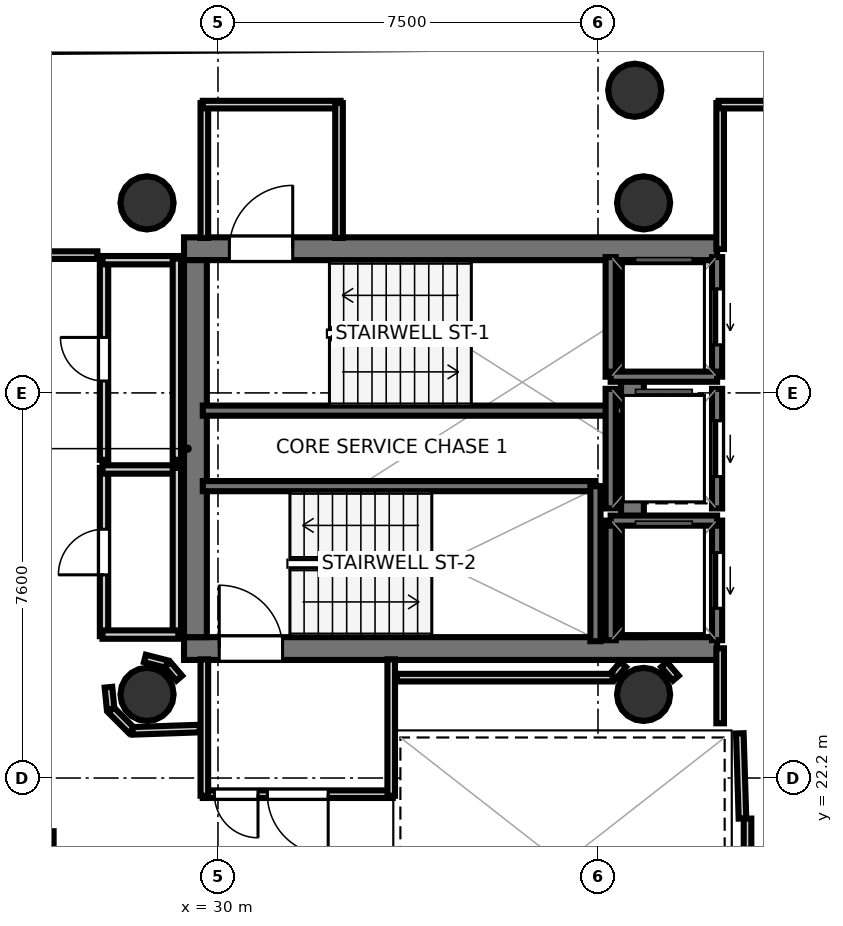
"""IFC4 building model, lengths in metres.
Left out: names, types, materials, properties, quantities, classifications, styles, units other than length and angle.
Written with IfcOpenShell. Run it as: python <this file> out.ifc"""

import sys

from ifc_helpers import new_model, si_unit, direction, frame, frame_2d, origin, origin_2d, place, context, subcontext, project, spatial, rectangle, hollow_circle, extrude, element, fill, save


model = new_model("IFC4")
c1 = context("Model", 3, precision=1e-05, world=origin(), true_north=direction((0.0, 1.0)))
c2 = subcontext(c1, "Body", "Model", "MODEL_VIEW")
j1 = project(units=[si_unit("LENGTHUNIT", "METRE"), si_unit("PLANEANGLEUNIT", "RADIAN")], contexts=[c1])
p1 = place(None, origin())
s1 = spatial("IfcSite", under=j1, at=p1, CompositionType="ELEMENT")
p2 = place(p1, origin())
s2 = spatial("IfcBuilding", under=s1, at=p2, CompositionType="ELEMENT")
p3 = place(p2, frame((0.0, 0.0, 253.8)))
s3 = spatial("IfcBuildingStorey", under=s2, at=p3, CompositionType="ELEMENT", Elevation=253.8)
p4 = place(p3, frame((29.33, 32.645, 0.0), z_axis=(0.0, 0.0, 1.0), x_axis=(1.0, 0.0, 0.0)))
e1 = element("IfcWall", 1, at=p4, inside=s3, PredefinedType="SHEAR", context=c2, shape_type="SweptSolid", body=[
    extrude(rectangle(XDim=10.52, YDim=0.45, at=frame_2d((5.26, 0.0))), origin(), (0.0, 0.0, 1.0), 3.52),
])
p5 = place(p4, frame((0.895, 0.0, 0.0)))
e2 = element("IfcOpeningElement", 2, at=p5, cuts=e1, PredefinedType="OPENING", context=c2, shape_type="SweptSolid", body=[
    extrude(rectangle(XDim=1.25, YDim=2.15, at=frame_2d((0.625, 1.075))), frame((0.0, 0.235, 0.0), z_axis=(0.0, -1.0, 0.0), x_axis=(1.0, 0.0, 0.0)), (0.0, 0.0, 1.0), 0.47),
])
p6 = place(p3, frame((29.33, 24.755, 0.0), z_axis=(0.0, 0.0, 1.0), x_axis=(1.0, 0.0, 0.0)))
e3 = element("IfcWall", 3, at=p6, inside=s3, PredefinedType="SHEAR", context=c2, shape_type="SweptSolid", body=[
    extrude(rectangle(XDim=10.52, YDim=0.45, at=frame_2d((5.26, 0.0))), origin(), (0.0, 0.0, 1.0), 3.52),
])
p7 = place(p6, frame((0.695, 0.0, 0.0)))
e4 = element("IfcOpeningElement", 4, at=p7, cuts=e3, PredefinedType="OPENING", context=c2, shape_type="SweptSolid", body=[
    extrude(rectangle(XDim=1.25, YDim=2.15, at=frame_2d((0.625, 1.075))), frame((0.0, 0.235, 0.0), z_axis=(0.0, -1.0, 0.0), x_axis=(1.0, 0.0, 0.0)), (0.0, 0.0, 1.0), 0.47),
])
for number, where, z_axis, x_axis in (
    (5, (29.555, 24.98, 0.0), (0.0, 0.0, 1.0), (0.0, 1.0, 0.0)),
    (6, (38.18, 24.98, 0.0), (0.0, 0.0, 1.0), (0.0, 1.0, 0.0)),
):
    element("IfcWall", number, at=place(p3, frame(where, z_axis=z_axis, x_axis=x_axis)), inside=s3, PredefinedType="SHEAR", context=c2, shape_type="SweptSolid", body=[
        extrude(rectangle(XDim=7.44, YDim=0.45, at=frame_2d((3.72, 0.0))), origin(), (0.0, 0.0, 1.0), 3.52),
    ])
for number, where, z_axis, x_axis in (
    (7, (28.6, 33.55, 0.0), (0.0, 0.0, 1.0), (1.0, 0.0, 0.0)),
    (8, (28.6, 23.85, 0.0), (0.0, 0.0, 1.0), (1.0, 0.0, 0.0)),
    (9, (38.4, 33.55, 0.0), (0.0, 0.0, 1.0), (1.0, 0.0, 0.0)),
    (10, (38.4, 23.85, 0.0), (0.0, 0.0, 1.0), (1.0, 0.0, 0.0)),
    (11, (38.225, 35.773, 0.0), (0.0, 0.0, 1.0), (1.0, 0.0, 0.0)),
):
    element("IfcColumn", number, at=place(p3, frame(where, z_axis=z_axis, x_axis=x_axis)), inside=s3, PredefinedType="COLUMN", context=c2, shape_type="SweptSolid", body=[
        extrude(hollow_circle(Radius=0.525, WallThickness=0.028, at=origin_2d()), origin(), (0.0, 0.0, 1.0), 3.7),
    ])
p8 = place(p3, frame((29.7, 29.45, 0.0), z_axis=(0.0, 0.0, 1.0), x_axis=(1.0, 0.0, 0.0)))
e12 = element("IfcWall", 12, at=p8, inside=s3, PredefinedType="SOLIDWALL", context=c2, shape_type="SweptSolid", body=[
    extrude(rectangle(XDim=8.3, YDim=0.2, at=frame_2d((4.15, 0.0))), origin(), (0.0, 0.0, 1.0), 3.52),
])
p9 = place(p3, frame((29.7, 27.96, 0.0), z_axis=(0.0, 0.0, 1.0), x_axis=(1.0, 0.0, 0.0)))
e13 = element("IfcWall", 13, at=p9, inside=s3, PredefinedType="SOLIDWALL", context=c2, shape_type="SweptSolid", body=[
    extrude(rectangle(XDim=7.75, YDim=0.2, at=frame_2d((3.875, 0.0))), origin(), (0.0, 0.0, 1.0), 3.52),
])
p10 = place(p3, frame((37.45, 24.9, 0.0), z_axis=(0.0, 0.0, 1.0), x_axis=(0.0, 1.0, 0.0)))
e14 = element("IfcWall", 14, at=p10, inside=s3, PredefinedType="SOLIDWALL", context=c2, shape_type="SweptSolid", body=[
    extrude(rectangle(XDim=3.06, YDim=0.2, at=frame_2d((1.53, 0.0))), origin(), (0.0, 0.0, 1.0), 3.52),
])
p11 = place(p3, frame((39.85, 30.12, 0.0), z_axis=(0.0, 0.0, 1.0), x_axis=(0.0, 1.0, 0.0)))
e15 = element("IfcWall", 15, at=p11, inside=s3, PredefinedType="SOLIDWALL", context=c2, shape_type="SweptSolid", body=[
    extrude(rectangle(XDim=2.36, YDim=0.2, at=frame_2d((1.18, 0.0))), origin(), (0.0, 0.0, 1.0), 3.52),
])
p12 = place(p11, frame((0.63, 0.0, 0.0)))
e16 = element("IfcOpeningElement", 16, at=p12, cuts=e15, PredefinedType="OPENING", context=c2, shape_type="SweptSolid", body=[
    extrude(rectangle(XDim=1.1, YDim=2.15, at=frame_2d((0.55, 1.075))), frame((0.0, 0.11, 0.0), z_axis=(0.0, -1.0, 0.0), x_axis=(1.0, 0.0, 0.0)), (0.0, 0.0, 1.0), 0.22),
])
p13 = place(p3, frame((37.75, 30.12, 0.0), z_axis=(0.0, 0.0, 1.0), x_axis=(0.0, 1.0, 0.0)))
e17 = element("IfcWall", 17, at=p13, inside=s3, PredefinedType="SOLIDWALL", context=c2, shape_type="SweptSolid", body=[
    extrude(rectangle(XDim=2.36, YDim=0.2, at=frame_2d((1.18, 0.0))), origin(), (0.0, 0.0, 1.0), 3.52),
])
p14 = place(p3, frame((37.75, 30.12, 0.0), z_axis=(0.0, 0.0, 1.0), x_axis=(1.0, 0.0, 0.0)))
e18 = element("IfcWall", 18, at=p14, inside=s3, PredefinedType="SOLIDWALL", context=c2, shape_type="SweptSolid", body=[
    extrude(rectangle(XDim=2.1, YDim=0.2, at=frame_2d((1.05, 0.0))), origin(), (0.0, 0.0, 1.0), 3.52),
])
p15 = place(p3, frame((39.85, 24.92, 0.0), z_axis=(0.0, 0.0, 1.0), x_axis=(0.0, 1.0, 0.0)))
e19 = element("IfcWall", 19, at=p15, inside=s3, PredefinedType="SOLIDWALL", context=c2, shape_type="SweptSolid", body=[
    extrude(rectangle(XDim=2.36, YDim=0.2, at=frame_2d((1.18, 0.0))), origin(), (0.0, 0.0, 1.0), 3.52),
])
p16 = place(p15, frame((0.63, 0.0, 0.0)))
e20 = element("IfcOpeningElement", 20, at=p16, cuts=e19, PredefinedType="OPENING", context=c2, shape_type="SweptSolid", body=[
    extrude(rectangle(XDim=1.1, YDim=2.15, at=frame_2d((0.55, 1.075))), frame((0.0, 0.11, 0.0), z_axis=(0.0, -1.0, 0.0), x_axis=(1.0, 0.0, 0.0)), (0.0, 0.0, 1.0), 0.22),
])
p17 = place(p3, frame((37.75, 24.92, 0.0), z_axis=(0.0, 0.0, 1.0), x_axis=(0.0, 1.0, 0.0)))
e21 = element("IfcWall", 21, at=p17, inside=s3, PredefinedType="SOLIDWALL", context=c2, shape_type="SweptSolid", body=[
    extrude(rectangle(XDim=2.36, YDim=0.2, at=frame_2d((1.18, 0.0))), origin(), (0.0, 0.0, 1.0), 3.52),
])
p18 = place(p3, frame((37.75, 27.28, 0.0), z_axis=(0.0, 0.0, 1.0), x_axis=(1.0, 0.0, 0.0)))
e22 = element("IfcWall", 22, at=p18, inside=s3, PredefinedType="SOLIDWALL", context=c2, shape_type="SweptSolid", body=[
    extrude(rectangle(XDim=2.1, YDim=0.2, at=frame_2d((1.05, 0.0))), origin(), (0.0, 0.0, 1.0), 3.52),
])
p19 = place(p3, frame((39.85, 27.52, 0.0), z_axis=(0.0, 0.0, 1.0), x_axis=(0.0, 1.0, 0.0)))
e23 = element("IfcWall", 23, at=p19, inside=s3, PredefinedType="SOLIDWALL", context=c2, shape_type="SweptSolid", body=[
    extrude(rectangle(XDim=2.36, YDim=0.2, at=frame_2d((1.18, 0.0))), origin(), (0.0, 0.0, 1.0), 3.52),
])
p20 = place(p19, frame((0.63, 0.0, 0.0)))
e24 = element("IfcOpeningElement", 24, at=p20, cuts=e23, PredefinedType="OPENING", context=c2, shape_type="SweptSolid", body=[
    extrude(rectangle(XDim=1.1, YDim=2.15, at=frame_2d((0.55, 1.075))), frame((0.0, 0.11, 0.0), z_axis=(0.0, -1.0, 0.0), x_axis=(1.0, 0.0, 0.0)), (0.0, 0.0, 1.0), 0.22),
])
p21 = place(p3, frame((37.75, 27.52, 0.0), z_axis=(0.0, 0.0, 1.0), x_axis=(0.0, 1.0, 0.0)))
e25 = element("IfcWall", 25, at=p21, inside=s3, PredefinedType="SOLIDWALL", context=c2, shape_type="SweptSolid", body=[
    extrude(rectangle(XDim=2.36, YDim=0.2, at=frame_2d((1.18, 0.0))), origin(), (0.0, 0.0, 1.0), 3.52),
])
p22 = place(p3, frame((29.731, 32.858, 0.0), z_axis=(0.0, 0.0, 1.0), x_axis=(0.0, 1.0, 0.0)))
e26 = element("IfcWall", 26, at=p22, inside=s3, PredefinedType="PARTITIONING", context=c2, shape_type="SweptSolid", body=[
    extrude(rectangle(XDim=2.662, YDim=0.15, at=frame_2d((1.331, 0.0))), origin(), (0.0, 0.0, 1.0), 2.84),
])
p23 = place(p3, frame((29.7, 35.489, 0.0), z_axis=(0.0, 0.0, 1.0), x_axis=(1.0, 0.0, 0.0)))
e27 = element("IfcWall", 27, at=p23, inside=s3, PredefinedType="PARTITIONING", context=c2, shape_type="SweptSolid", body=[
    extrude(rectangle(XDim=2.72, YDim=0.15, at=frame_2d((1.36, 0.0))), origin(), (0.0, 0.0, 1.0), 2.84),
])
p24 = place(p3, frame((32.389, 35.52, 0.0), z_axis=(0.0, 0.0, 1.0), x_axis=(0.0, -1.0, 0.0)))
e28 = element("IfcWall", 28, at=p24, inside=s3, PredefinedType="PARTITIONING", context=c2, shape_type="SweptSolid", body=[
    extrude(rectangle(XDim=2.662, YDim=0.15, at=frame_2d((1.331, 0.0))), origin(), (0.0, 0.0, 1.0), 2.84),
])
p25 = place(p3, frame((33.45, 21.881, 0.0), z_axis=(0.0, 0.0, 1.0), x_axis=(-1.0, 0.0, 0.0)))
e29 = element("IfcWall", 29, at=p25, inside=s3, PredefinedType="PARTITIONING", context=c2, shape_type="SweptSolid", body=[
    extrude(rectangle(XDim=3.75, YDim=0.15, at=frame_2d((1.875, 0.0))), origin(), (0.0, 0.0, 1.0), 2.84),
])
p26 = place(p25, frame((1.275, 0.0, 0.0)))
e30 = element("IfcOpeningElement", 30, at=p26, cuts=e29, PredefinedType="OPENING", context=c2, shape_type="SweptSolid", body=[
    extrude(rectangle(XDim=1.2, YDim=2.15, at=frame_2d((0.6, 1.075))), frame((0.0, 0.085, 0.0), z_axis=(0.0, -1.0, 0.0), x_axis=(1.0, 0.0, 0.0)), (0.0, 0.0, 1.0), 0.17),
])
p27 = place(p25, frame((2.66, 0.0, 0.0)))
e31 = element("IfcOpeningElement", 31, at=p27, cuts=e29, PredefinedType="OPENING", context=c2, shape_type="SweptSolid", body=[
    extrude(rectangle(XDim=0.86, YDim=2.05, at=frame_2d((0.43, 1.025))), frame((0.0, 0.085, 0.0), z_axis=(0.0, -1.0, 0.0), x_axis=(1.0, 0.0, 0.0)), (0.0, 0.0, 1.0), 0.17),
])
for number, where, z_axis, x_axis in (
    (32, (29.731, 21.85, 0.0), (0.0, 0.0, 1.0), (0.0, 1.0, 0.0)),
    (33, (33.419, 24.542, 0.0), (0.0, 0.0, 1.0), (0.0, -1.0, 0.0)),
):
    element("IfcWall", number, at=place(p3, frame(where, z_axis=z_axis, x_axis=x_axis)), inside=s3, PredefinedType="PARTITIONING", context=c2, shape_type="SweptSolid", body=[
        extrude(rectangle(XDim=2.692, YDim=0.15, at=frame_2d((1.346, 0.0))), origin(), (0.0, 0.0, 1.0), 2.84),
    ])
p28 = place(p3, frame((40.351, 21.401, 0.0), z_axis=(0.0, 0.0, 1.0), x_axis=(-0.031058045979, 0.999517582527, 0.0)))
e34 = element("IfcWall", 34, at=p28, inside=s3, PredefinedType="PARTITIONING", context=c2, shape_type="SweptSolid", body=[
    extrude(rectangle(XDim=1.682, YDim=0.15, at=frame_2d((0.841, 0.0))), origin(), (0.0, 0.0, 1.0), 2.84),
])
p29 = place(p3, frame((39.911, 23.28, 0.0), z_axis=(0.0, 0.0, 1.0), x_axis=(0.0, 1.0, 0.0)))
e35 = element("IfcWall", 35, at=p29, inside=s3, PredefinedType="PARTITIONING", context=c2, shape_type="SweptSolid", body=[
    extrude(rectangle(XDim=1.48, YDim=0.15, at=frame_2d((0.74, 0.0))), origin(), (0.0, 0.0, 1.0), 2.84),
])
p30 = place(p3, frame((39.911, 32.64, 0.0), z_axis=(0.0, 0.0, 1.0), x_axis=(0.0, 1.0, 0.0)))
e36 = element("IfcWall", 36, at=p30, inside=s3, PredefinedType="PARTITIONING", context=c2, shape_type="SweptSolid", body=[
    extrude(rectangle(XDim=2.88, YDim=0.15, at=frame_2d((1.44, 0.0))), origin(), (0.0, 0.0, 1.0), 2.84),
])
p31 = place(p3, frame((39.88, 35.489, 0.0), z_axis=(0.0, 0.0, 1.0), x_axis=(1.0, 0.0, 0.0)))
e37 = element("IfcWall", 37, at=p31, inside=s3, PredefinedType="PARTITIONING", context=c2, shape_type="SweptSolid", body=[
    extrude(rectangle(XDim=1.48, YDim=0.15, at=frame_2d((0.74, 0.0))), origin(), (0.0, 0.0, 1.0), 2.84),
])
p32 = place(p3, frame((40.451, 18.08, 0.0), z_axis=(0.0, 0.0, 1.0), x_axis=(0.0, 1.0, 0.0)))
e38 = element("IfcWall", 38, at=p32, inside=s3, PredefinedType="PARTITIONING", context=c2, shape_type="SweptSolid", body=[
    extrude(rectangle(XDim=3.32, YDim=0.15, at=frame_2d((1.66, 0.0))), origin(), (0.0, 0.0, 1.0), 2.84),
])
p33 = place(p3, frame((27.751, 25.0, 0.0), z_axis=(0.0, 0.0, 1.0), x_axis=(0.0, 1.0, 0.0)))
e39 = element("IfcWall", 39, at=p33, inside=s3, PredefinedType="PLUMBINGWALL", context=c2, shape_type="SweptSolid", body=[
    extrude(rectangle(XDim=3.32, YDim=0.165, at=frame_2d((1.66, 0.0))), origin(), (0.0, 0.0, 1.0), 2.84),
])
p34 = place(p33, frame((1.21, 0.0, 0.0)))
e40 = element("IfcOpeningElement", 40, at=p34, cuts=e39, PredefinedType="OPENING", context=c2, shape_type="SweptSolid", body=[
    extrude(rectangle(XDim=0.9, YDim=2.1, at=frame_2d((0.45, 1.05))), frame((0.0, 0.093, 0.0), z_axis=(0.0, -1.0, 0.0), x_axis=(1.0, 0.0, 0.0)), (0.0, 0.0, 1.0), 0.185),
])
p35 = place(p3, frame((27.72, 28.289, 0.0), z_axis=(0.0, 0.0, 1.0), x_axis=(1.0, 0.0, 0.0)))
e41 = element("IfcWall", 41, at=p35, inside=s3, PredefinedType="PLUMBINGWALL", context=c2, shape_type="SweptSolid", body=[
    extrude(rectangle(XDim=1.5, YDim=0.165, at=frame_2d((0.75, 0.0))), origin(), (0.0, 0.0, 1.0), 2.84),
])
p36 = place(p3, frame((29.189, 28.32, 0.0), z_axis=(0.0, 0.0, 1.0), x_axis=(0.0, -1.0, 0.0)))
e42 = element("IfcWall", 42, at=p36, inside=s3, PredefinedType="PLUMBINGWALL", context=c2, shape_type="SweptSolid", body=[
    extrude(rectangle(XDim=3.32, YDim=0.165, at=frame_2d((1.66, 0.0))), origin(), (0.0, 0.0, 1.0), 2.84),
])
p37 = place(p3, frame((29.22, 25.031, 0.0), z_axis=(0.0, 0.0, 1.0), x_axis=(-1.0, 0.0, 0.0)))
e43 = element("IfcWall", 43, at=p37, inside=s3, PredefinedType="PLUMBINGWALL", context=c2, shape_type="SweptSolid", body=[
    extrude(rectangle(XDim=1.5, YDim=0.165, at=frame_2d((0.75, 0.0))), origin(), (0.0, 0.0, 1.0), 2.84),
])
p38 = place(p3, frame((27.751, 28.48, 0.0), z_axis=(0.0, 0.0, 1.0), x_axis=(0.0, 1.0, 0.0)))
e44 = element("IfcWall", 44, at=p38, inside=s3, PredefinedType="PLUMBINGWALL", context=c2, shape_type="SweptSolid", body=[
    extrude(rectangle(XDim=3.97, YDim=0.165, at=frame_2d((1.985, 0.0))), origin(), (0.0, 0.0, 1.0), 2.84),
])
p39 = place(p38, frame((1.555, 0.0, 0.0)))
e45 = element("IfcOpeningElement", 45, at=p39, cuts=e44, PredefinedType="OPENING", context=c2, shape_type="SweptSolid", body=[
    extrude(rectangle(XDim=0.86, YDim=2.05, at=frame_2d((0.43, 1.025))), frame((0.0, 0.093, 0.0), z_axis=(0.0, -1.0, 0.0), x_axis=(1.0, 0.0, 0.0)), (0.0, 0.0, 1.0), 0.185),
])
p40 = place(p3, frame((27.72, 32.419, 0.0), z_axis=(0.0, 0.0, 1.0), x_axis=(1.0, 0.0, 0.0)))
e46 = element("IfcWall", 46, at=p40, inside=s3, PredefinedType="PLUMBINGWALL", context=c2, shape_type="SweptSolid", body=[
    extrude(rectangle(XDim=1.5, YDim=0.165, at=frame_2d((0.75, 0.0))), origin(), (0.0, 0.0, 1.0), 2.84),
])
p41 = place(p3, frame((29.189, 32.45, 0.0), z_axis=(0.0, 0.0, 1.0), x_axis=(0.0, -1.0, 0.0)))
e47 = element("IfcWall", 47, at=p41, inside=s3, PredefinedType="PLUMBINGWALL", context=c2, shape_type="SweptSolid", body=[
    extrude(rectangle(XDim=3.97, YDim=0.165, at=frame_2d((1.985, 0.0))), origin(), (0.0, 0.0, 1.0), 2.84),
])
p42 = place(p3, frame((29.236, 24.17, 0.0), z_axis=(0.0, 0.0, 1.0), x_axis=(-0.652260263346, 0.757995084984, 0.0)))
e48 = element("IfcWall", 48, at=p42, inside=s3, PredefinedType="PARTITIONING", context=c2, shape_type="SweptSolid", body=[
    extrude(rectangle(XDim=0.355, YDim=0.15, at=frame_2d((0.178, 0.0))), origin(), (0.0, 0.0, 1.0), 2.84),
])
p43 = place(p3, frame((28.988, 24.45, 0.0), z_axis=(0.0, 0.0, 1.0), x_axis=(-0.968704505916, 0.248216800836, 0.0)))
e49 = element("IfcWall", 49, at=p43, inside=s3, PredefinedType="PARTITIONING", context=c2, shape_type="SweptSolid", body=[
    extrude(rectangle(XDim=0.445, YDim=0.15, at=frame_2d((0.222, 0.0))), origin(), (0.0, 0.0, 1.0), 2.84),
])
p44 = place(p3, frame((39.036, 24.17, 0.0), z_axis=(0.0, 0.0, 1.0), x_axis=(-0.652260263346, 0.757995084984, 0.0)))
e50 = element("IfcWall", 50, at=p44, inside=s3, PredefinedType="PARTITIONING", context=c2, shape_type="SweptSolid", body=[
    extrude(rectangle(XDim=0.355, YDim=0.15, at=frame_2d((0.178, 0.0))), origin(), (0.0, 0.0, 1.0), 2.84),
])
p45 = place(p3, frame((37.996, 24.44, 0.0), z_axis=(0.0, 0.0, 1.0), x_axis=(-0.652425645794, -0.757852740782, 0.0)))
e51 = element("IfcWall", 51, at=p45, inside=s3, PredefinedType="PARTITIONING", context=c2, shape_type="SweptSolid", body=[
    extrude(rectangle(XDim=0.32, YDim=0.15, at=frame_2d((0.16, 0.0))), origin(), (0.0, 0.0, 1.0), 2.84),
])
p46 = place(p3, frame((37.787, 24.181, 0.0), z_axis=(0.0, 0.0, 1.0), x_axis=(-1.0, 0.0, 0.0)))
e52 = element("IfcWall", 52, at=p46, inside=s3, PredefinedType="PARTITIONING", context=c2, shape_type="SweptSolid", body=[
    extrude(rectangle(XDim=4.257, YDim=0.15, at=frame_2d((2.129, 0.0))), origin(), (0.0, 0.0, 1.0), 2.84),
])
p47 = place(p3, frame((27.838, 23.992, 0.0), z_axis=(0.0, 0.0, 1.0), x_axis=(0.098273407977, -0.995159453196, 0.0)))
e53 = element("IfcWall", 53, at=p47, inside=s3, PredefinedType="PARTITIONING", context=c2, shape_type="SweptSolid", body=[
    extrude(rectangle(XDim=0.432, YDim=0.15, at=frame_2d((0.216, 0.0))), origin(), (0.0, 0.0, 1.0), 2.84),
])
p48 = place(p3, frame((27.89, 23.543, 0.0), z_axis=(0.0, 0.0, 1.0), x_axis=(0.707106781187, -0.707106781187, 0.0)))
e54 = element("IfcWall", 54, at=p48, inside=s3, PredefinedType="PARTITIONING", context=c2, shape_type="SweptSolid", body=[
    extrude(rectangle(XDim=0.57, YDim=0.15, at=frame_2d((0.285, 0.0))), origin(), (0.0, 0.0, 1.0), 2.84),
])
p49 = place(p3, frame((28.316, 23.131, 0.0), z_axis=(0.0, 0.0, 1.0), x_axis=(0.999405342193, 0.034481328227, 0.0)))
e55 = element("IfcWall", 55, at=p49, inside=s3, PredefinedType="PARTITIONING", context=c2, shape_type="SweptSolid", body=[
    extrude(rectangle(XDim=1.324, YDim=0.15, at=frame_2d((0.662, 0.0))), origin(), (0.0, 0.0, 1.0), 2.84),
])
p50 = place(p3, frame((26.681, 17.95, 0.0), z_axis=(0.0, 0.0, 1.0), x_axis=(0.0, 1.0, 0.0)))
e56 = element("IfcWall", 56, at=p50, inside=s3, PredefinedType="PARTITIONING", context=c2, shape_type="SweptSolid", body=[
    extrude(rectangle(XDim=3.2, YDim=0.15, at=frame_2d((1.6, 0.0))), origin(), (0.0, 0.0, 1.0), 2.84),
])
p51 = place(p3, frame((25.25, 32.519, 0.0), z_axis=(0.0, 0.0, 1.0), x_axis=(1.0, 0.0, 0.0)))
e57 = element("IfcWall", 57, at=p51, inside=s3, PredefinedType="PARTITIONING", context=c2, shape_type="SweptSolid", body=[
    extrude(rectangle(XDim=2.37, YDim=0.15, at=frame_2d((1.185, 0.0))), origin(), (0.0, 0.0, 1.0), 2.84),
])
p52 = place(p3, frame((21.853, 36.561, 0.0), z_axis=(0.0, 0.0, 1.0), x_axis=(0.999969554507, 0.007803208298, 0.0)))
e58 = element("IfcWall", 58, at=p52, inside=s3, PredefinedType="PARTITIONING", context=c2, shape_type="SweptSolid", body=[
    extrude(rectangle(XDim=34.76, YDim=0.14, at=frame_2d((17.38, 0.0))), origin(), (0.0, 0.0, 1.0), 2.84),
])
p53 = place(p5, origin())
e59 = element("IfcDoor", 59, at=p53, inside=s3, OperationType="SINGLE_SWING_RIGHT", PredefinedType="DOOR", context=c2, shape_type="SweptSolid", body=[
    extrude(rectangle(XDim=1.25, YDim=2.15, at=frame_2d((0.625, 1.075))), frame((0.0, 0.025, 0.0), z_axis=(0.0, -1.0, 0.0), x_axis=(1.0, 0.0, 0.0)), (0.0, 0.0, 1.0), 0.05),
])
fill(e2, e59)
p54 = place(p7, origin())
e60 = element("IfcDoor", 60, at=p54, inside=s3, OperationType="SINGLE_SWING_LEFT", PredefinedType="DOOR", context=c2, shape_type="SweptSolid", body=[
    extrude(rectangle(XDim=1.25, YDim=2.15, at=frame_2d((0.625, 1.075))), frame((0.0, 0.025, 0.0), z_axis=(0.0, -1.0, 0.0), x_axis=(1.0, 0.0, 0.0)), (0.0, 0.0, 1.0), 0.05),
])
fill(e4, e60)
p55 = place(p12, origin())
e61 = element("IfcDoor", 61, at=p55, inside=s3, OperationType="SLIDING_TO_LEFT", PredefinedType="DOOR", context=c2, shape_type="SweptSolid", body=[
    extrude(rectangle(XDim=1.1, YDim=2.15, at=frame_2d((0.55, 1.075))), frame((0.0, 0.025, 0.0), z_axis=(0.0, -1.0, 0.0), x_axis=(1.0, 0.0, 0.0)), (0.0, 0.0, 1.0), 0.05),
])
fill(e16, e61)
p56 = place(p16, origin())
e62 = element("IfcDoor", 62, at=p56, inside=s3, OperationType="SLIDING_TO_LEFT", PredefinedType="DOOR", context=c2, shape_type="SweptSolid", body=[
    extrude(rectangle(XDim=1.1, YDim=2.15, at=frame_2d((0.55, 1.075))), frame((0.0, 0.025, 0.0), z_axis=(0.0, -1.0, 0.0), x_axis=(1.0, 0.0, 0.0)), (0.0, 0.0, 1.0), 0.05),
])
fill(e20, e62)
p57 = place(p20, origin())
e63 = element("IfcDoor", 63, at=p57, inside=s3, OperationType="SLIDING_TO_LEFT", PredefinedType="DOOR", context=c2, shape_type="SweptSolid", body=[
    extrude(rectangle(XDim=1.1, YDim=2.15, at=frame_2d((0.55, 1.075))), frame((0.0, 0.025, 0.0), z_axis=(0.0, -1.0, 0.0), x_axis=(1.0, 0.0, 0.0)), (0.0, 0.0, 1.0), 0.05),
])
fill(e24, e63)
p58 = place(p26, origin())
e64 = element("IfcDoor", 64, at=p58, inside=s3, OperationType="SINGLE_SWING_LEFT", PredefinedType="DOOR", context=c2, shape_type="SweptSolid", body=[
    extrude(rectangle(XDim=1.2, YDim=2.15, at=frame_2d((0.6, 1.075))), frame((0.0, 0.025, 0.0), z_axis=(0.0, -1.0, 0.0), x_axis=(1.0, 0.0, 0.0)), (0.0, 0.0, 1.0), 0.05),
])
fill(e30, e64)
p59 = place(p34, origin())
e65 = element("IfcDoor", 65, at=p59, inside=s3, OperationType="SINGLE_SWING_LEFT", PredefinedType="DOOR", context=c2, shape_type="SweptSolid", body=[
    extrude(rectangle(XDim=0.9, YDim=2.1, at=frame_2d((0.45, 1.05))), frame((0.0, 0.025, 0.0), z_axis=(0.0, -1.0, 0.0), x_axis=(1.0, 0.0, 0.0)), (0.0, 0.0, 1.0), 0.05),
])
fill(e40, e65)
p60 = place(p39, origin())
e66 = element("IfcDoor", 66, at=p60, inside=s3, OperationType="SINGLE_SWING_RIGHT", PredefinedType="DOOR", context=c2, shape_type="SweptSolid", body=[
    extrude(rectangle(XDim=0.86, YDim=2.05, at=frame_2d((0.43, 1.025))), frame((0.0, 0.025, 0.0), z_axis=(0.0, -1.0, 0.0), x_axis=(1.0, 0.0, 0.0)), (0.0, 0.0, 1.0), 0.05),
])
fill(e45, e66)
p61 = place(p27, origin())
e67 = element("IfcDoor", 67, at=p61, inside=s3, OperationType="SINGLE_SWING_LEFT", PredefinedType="DOOR", context=c2, shape_type="SweptSolid", body=[
    extrude(rectangle(XDim=0.86, YDim=2.05, at=frame_2d((0.43, 1.025))), frame((0.0, 0.025, 0.0), z_axis=(0.0, -1.0, 0.0), x_axis=(1.0, 0.0, 0.0)), (0.0, 0.0, 1.0), 0.05),
])
fill(e31, e67)
save(model, sys.argv[1])
